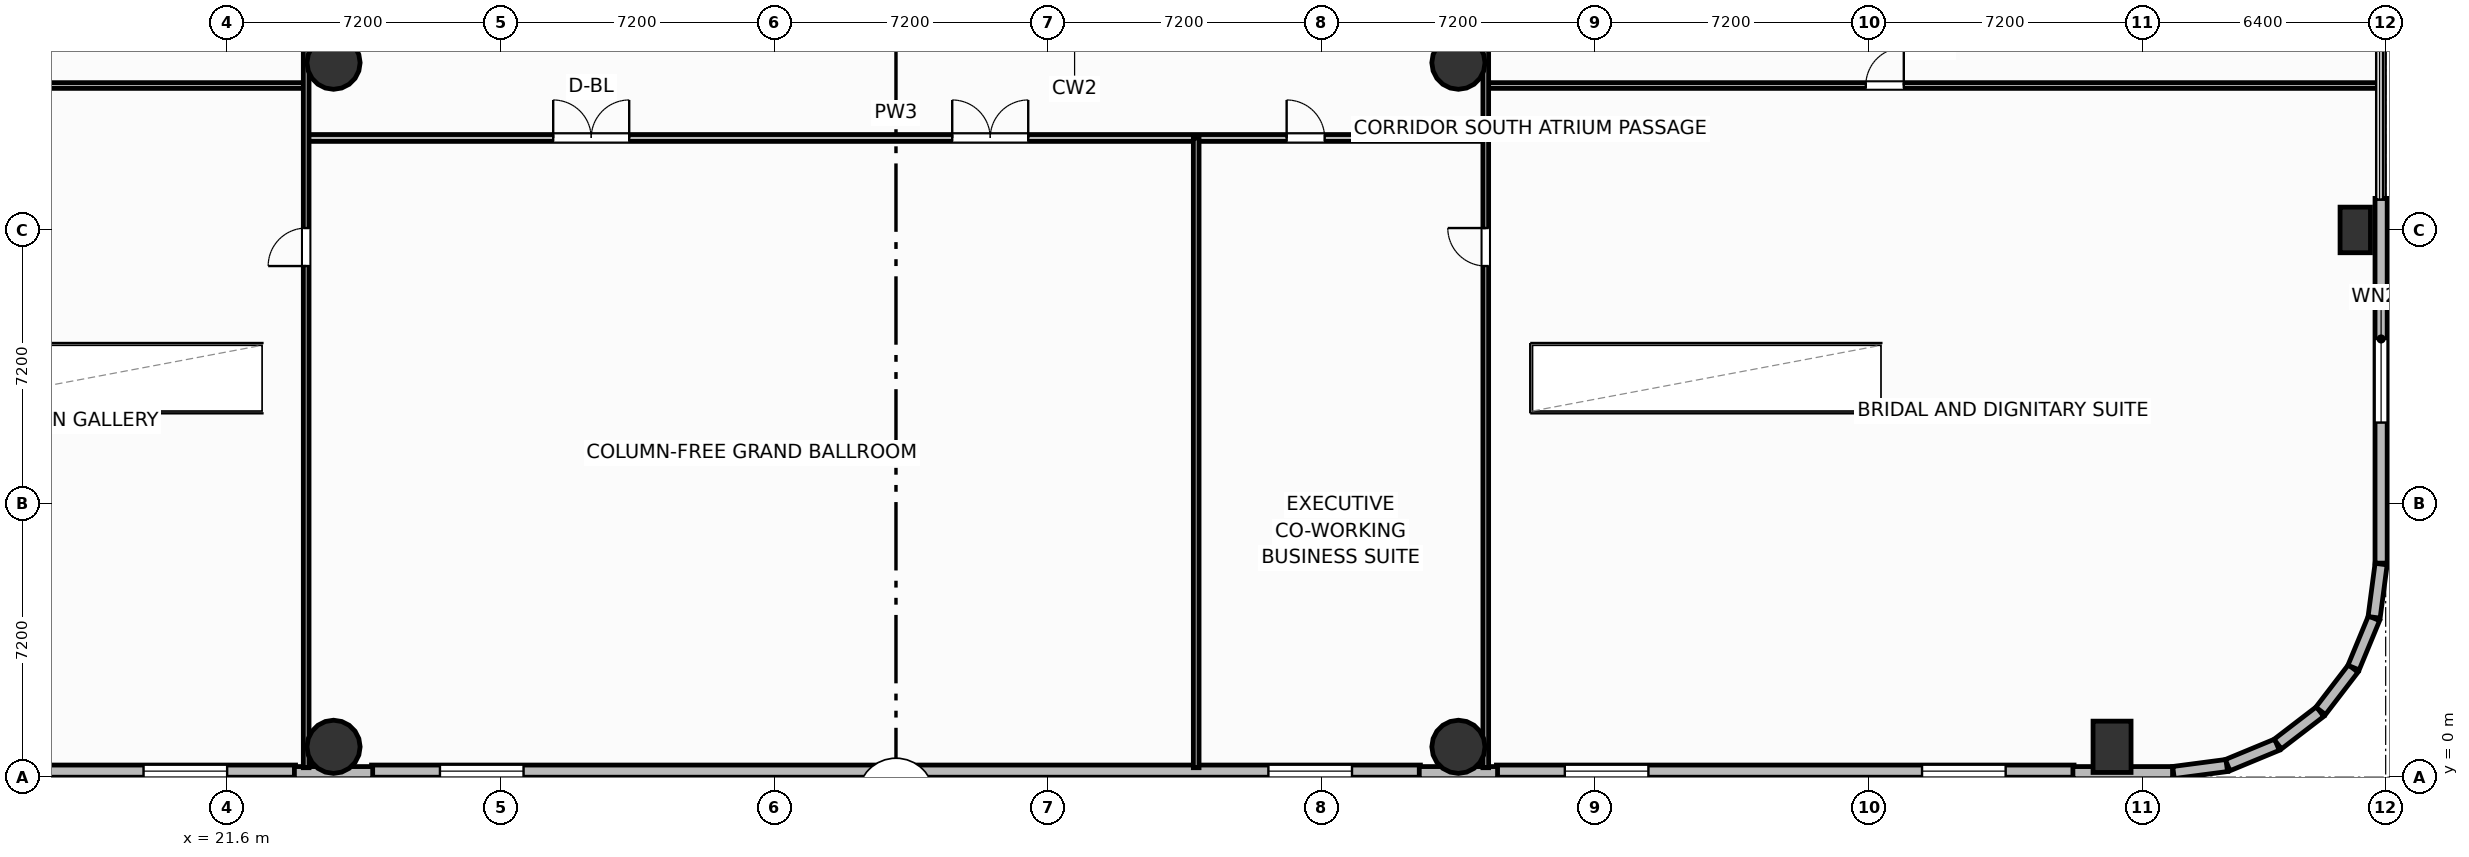
"""IFC4 building model, lengths in metres.
Left out: names, types, materials, properties, quantities, classifications, styles, units other than length and angle.
Written with IfcOpenShell. Run it as: python <this file> out.ifc"""

import sys

from ifc_helpers import new_model, si_unit, direction, frame, frame_2d, origin, origin_2d, place, context, subcontext, project, spatial, rectangle, circle, extrude, element, fill, save


model = new_model("IFC4")
c1 = context("Model", 3, precision=1e-05, world=origin(), true_north=direction((0.0, 1.0)))
c2 = subcontext(c1, "Body", "Model", "MODEL_VIEW")
j1 = project(units=[si_unit("LENGTHUNIT", "METRE"), si_unit("PLANEANGLEUNIT", "RADIAN")], contexts=[c1])
p1 = place(None, origin())
s1 = spatial("IfcSite", under=j1, at=p1, CompositionType="ELEMENT")
p2 = place(p1, origin())
s2 = spatial("IfcBuilding", under=s1, at=p2, CompositionType="ELEMENT")
p3 = place(p2, frame((0.0, 0.0, 16.2)))
s3 = spatial("IfcBuildingStorey", under=s2, at=p3, CompositionType="ELEMENT", Elevation=16.2)
for number, where, z_axis, x_axis in (
    (1, (24.4, 0.8, 0.0), (0.0, 0.0, 1.0), (1.0, 0.0, 0.0)),
    (2, (54.0, 0.8, 0.0), (0.0, 0.0, 1.0), (1.0, 0.0, 0.0)),
):
    element("IfcColumn", number, at=place(p3, frame(where, z_axis=z_axis, x_axis=x_axis)), inside=s3, PredefinedType="COLUMN", context=c2, shape_type="SweptSolid", body=[
        extrude(circle(Radius=0.7, at=origin_2d()), origin(), (0.0, 0.0, 1.0), 5.4),
    ])
p4 = place(p3, frame((71.2, 0.8, 0.0), z_axis=(0.0, 0.0, 1.0), x_axis=(1.0, 0.0, 0.0)))
e3 = element("IfcColumn", 3, at=p4, inside=s3, PredefinedType="COLUMN", context=c2, shape_type="SweptSolid", body=[
    extrude(rectangle(XDim=1.0, YDim=1.35, at=origin_2d()), origin(), (0.0, 0.0, 1.0), 5.4),
])
for number, where, z_axis, x_axis in (
    (4, (24.4, 18.8, 0.0), (0.0, 0.0, 1.0), (1.0, 0.0, 0.0)),
    (5, (54.0, 18.8, 0.0), (0.0, 0.0, 1.0), (1.0, 0.0, 0.0)),
):
    element("IfcColumn", number, at=place(p3, frame(where, z_axis=z_axis, x_axis=x_axis)), inside=s3, PredefinedType="COLUMN", context=c2, shape_type="SweptSolid", body=[
        extrude(circle(Radius=0.7, at=origin_2d()), origin(), (0.0, 0.0, 1.0), 5.4),
    ])
p5 = place(p3, frame((77.6, 14.4, 0.0), z_axis=(0.0, 0.0, 1.0), x_axis=(1.0, 0.0, 0.0)))
e6 = element("IfcColumn", 6, at=p5, inside=s3, PredefinedType="PILASTER", context=c2, shape_type="SweptSolid", body=[
    extrude(rectangle(XDim=0.8, YDim=1.2, at=origin_2d()), origin(), (0.0, 0.0, 1.0), 5.4),
])
p6 = place(p3, frame((23.4, 0.16, 0.0), z_axis=(0.0, 0.0, 1.0), x_axis=(-1.0, 0.0, 0.0)))
e7 = element("IfcWall", 7, at=p6, inside=s3, PredefinedType="SOLIDWALL", context=c2, shape_type="SweptSolid", body=[
    extrude(rectangle(XDim=15.2, YDim=0.32, at=frame_2d((7.6, 0.0))), origin(), (0.0, 0.0, 1.0), 4.03),
])
p7 = place(p6, frame((1.8, 0.0, 0.8)))
e8 = element("IfcOpeningElement", 8, at=p7, cuts=e7, PredefinedType="OPENING", context=c2, shape_type="SweptSolid", body=[
    extrude(rectangle(XDim=2.2, YDim=1.85, at=frame_2d((1.1, 0.925))), frame((0.0, 0.17, 0.0), z_axis=(0.0, -1.0, 0.0), x_axis=(1.0, 0.0, 0.0)), (0.0, 0.0, 1.0), 0.34),
])
p8 = place(p6, frame((11.2, 0.0, 0.8)))
e9 = element("IfcOpeningElement", 9, at=p8, cuts=e7, PredefinedType="OPENING", context=c2, shape_type="SweptSolid", body=[
    extrude(rectangle(XDim=2.2, YDim=1.85, at=frame_2d((1.1, 0.925))), frame((0.0, 0.17, 0.0), z_axis=(0.0, -1.0, 0.0), x_axis=(1.0, 0.0, 0.0)), (0.0, 0.0, 1.0), 0.34),
])
p9 = place(p3, frame((53.0, 0.16, 0.0), z_axis=(0.0, 0.0, 1.0), x_axis=(-1.0, 0.0, 0.0)))
e10 = element("IfcWall", 10, at=p9, inside=s3, PredefinedType="SOLIDWALL", context=c2, shape_type="SweptSolid", body=[
    extrude(rectangle(XDim=27.6, YDim=0.32, at=frame_2d((13.8, 0.0))), origin(), (0.0, 0.0, 1.0), 4.03),
])
p10 = place(p9, frame((1.8, 0.0, 0.8)))
e11 = element("IfcOpeningElement", 11, at=p10, cuts=e10, PredefinedType="OPENING", context=c2, shape_type="SweptSolid", body=[
    extrude(rectangle(XDim=2.2, YDim=1.85, at=frame_2d((1.1, 0.925))), frame((0.0, 0.17, 0.0), z_axis=(0.0, -1.0, 0.0), x_axis=(1.0, 0.0, 0.0)), (0.0, 0.0, 1.0), 0.34),
])
p11 = place(p9, frame((23.6, 0.0, 0.8)))
e12 = element("IfcOpeningElement", 12, at=p11, cuts=e10, PredefinedType="OPENING", context=c2, shape_type="SweptSolid", body=[
    extrude(rectangle(XDim=2.2, YDim=1.85, at=frame_2d((1.1, 0.925))), frame((0.0, 0.17, 0.0), z_axis=(0.0, -1.0, 0.0), x_axis=(1.0, 0.0, 0.0)), (0.0, 0.0, 1.0), 0.34),
])
p12 = place(p3, frame((70.2, 0.16, 0.0), z_axis=(0.0, 0.0, 1.0), x_axis=(-1.0, 0.0, 0.0)))
e13 = element("IfcWall", 13, at=p12, inside=s3, PredefinedType="SOLIDWALL", context=c2, shape_type="SweptSolid", body=[
    extrude(rectangle(XDim=15.2, YDim=0.32, at=frame_2d((7.6, 0.0))), origin(), (0.0, 0.0, 1.0), 4.03),
])
p13 = place(p12, frame((1.8, 0.0, 0.8)))
e14 = element("IfcOpeningElement", 14, at=p13, cuts=e13, PredefinedType="OPENING", context=c2, shape_type="SweptSolid", body=[
    extrude(rectangle(XDim=2.2, YDim=1.85, at=frame_2d((1.1, 0.925))), frame((0.0, 0.17, 0.0), z_axis=(0.0, -1.0, 0.0), x_axis=(1.0, 0.0, 0.0)), (0.0, 0.0, 1.0), 0.34),
])
p14 = place(p12, frame((11.2, 0.0, 0.8)))
e15 = element("IfcOpeningElement", 15, at=p14, cuts=e13, PredefinedType="OPENING", context=c2, shape_type="SweptSolid", body=[
    extrude(rectangle(XDim=2.2, YDim=1.85, at=frame_2d((1.1, 0.925))), frame((0.0, 0.17, 0.0), z_axis=(0.0, -1.0, 0.0), x_axis=(1.0, 0.0, 0.0)), (0.0, 0.0, 1.0), 0.34),
])
p15 = place(p3, frame((23.37, 0.12, 0.0), z_axis=(0.0, 0.0, 1.0), x_axis=(1.0, 0.0, 0.0)))
e16 = element("IfcWall", 16, at=p15, inside=s3, PredefinedType="SOLIDWALL", context=c2, shape_type="SweptSolid", body=[
    extrude(rectangle(XDim=2.06, YDim=0.32, at=frame_2d((1.03, 0.0))), origin(), (0.0, 0.0, 1.0), 4.03),
])
p16 = place(p3, frame((52.97, 0.12, 0.0), z_axis=(0.0, 0.0, 1.0), x_axis=(1.0, 0.0, 0.0)))
e17 = element("IfcWall", 17, at=p16, inside=s3, PredefinedType="SOLIDWALL", context=c2, shape_type="SweptSolid", body=[
    extrude(rectangle(XDim=2.06, YDim=0.32, at=frame_2d((1.03, 0.0))), origin(), (0.0, 0.0, 1.0), 4.03),
])
p17 = place(p3, frame((70.17, 0.12, 0.0), z_axis=(0.0, 0.0, 1.0), x_axis=(1.0, 0.0, 0.0)))
e18 = element("IfcWall", 18, at=p17, inside=s3, PredefinedType="SOLIDWALL", context=c2, shape_type="SweptSolid", body=[
    extrude(rectangle(XDim=2.622, YDim=0.32, at=frame_2d((1.311, 0.0))), origin(), (0.0, 0.0, 1.0), 4.03),
])
p18 = place(p3, frame((72.817, 0.123, 0.0), z_axis=(0.0, 0.0, 1.0), x_axis=(0.991457235349, 0.130432168094, 0.0)))
e19 = element("IfcWall", 19, at=p18, inside=s3, PredefinedType="SOLIDWALL", context=c2, shape_type="SweptSolid", body=[
    extrude(rectangle(XDim=1.413, YDim=0.32, at=frame_2d((0.707, 0.0))), origin(), (0.0, 0.0, 1.0), 4.03),
])
for number, where, z_axis, x_axis in (
    (20, (74.241, 0.317, 0.0), (0.0, 0.0, 1.0), (0.924, 0.383, 0.0)),
    (21, (75.559, 0.87, 0.0), (0.0, 0.0, 1.0), (0.793, 0.609, 0.0)),
    (22, (76.689, 1.746, 0.0), (0.0, 0.0, 1.0), (0.609, 0.793, 0.0)),
    (23, (77.554, 2.884, 0.0), (0.0, 0.0, 1.0), (0.383, 0.924, 0.0)),
):
    element("IfcWall", number, at=place(p3, frame(where, z_axis=z_axis, x_axis=x_axis)), inside=s3, PredefinedType="SOLIDWALL", context=c2, shape_type="SweptSolid", body=[
        extrude(rectangle(XDim=1.405, YDim=0.32, at=frame_2d((0.703, 0.0))), origin(), (0.0, 0.0, 1.0), 4.03),
    ])
p19 = place(p3, frame((78.096, 4.207, 0.0), z_axis=(0.0, 0.0, 1.0), x_axis=(0.130432168094, 0.991457235349, 0.0)))
e24 = element("IfcWall", 24, at=p19, inside=s3, PredefinedType="SOLIDWALL", context=c2, shape_type="SweptSolid", body=[
    extrude(rectangle(XDim=1.413, YDim=0.32, at=frame_2d((0.707, 0.0))), origin(), (0.0, 0.0, 1.0), 4.03),
])
p20 = place(p3, frame((78.28, 5.633, 0.0), z_axis=(0.0, 0.0, 1.0), x_axis=(0.0, 1.0, 0.0)))
e25 = element("IfcWall", 25, at=p20, inside=s3, PredefinedType="SOLIDWALL", context=c2, shape_type="SweptSolid", body=[
    extrude(rectangle(XDim=9.597, YDim=0.32, at=frame_2d((4.799, 0.0))), origin(), (0.0, 0.0, 1.0), 4.03),
])
p21 = place(p20, frame((3.698, 0.0, 0.8)))
e26 = element("IfcOpeningElement", 26, at=p21, cuts=e25, PredefinedType="OPENING", context=c2, shape_type="SweptSolid", body=[
    extrude(rectangle(XDim=2.2, YDim=2.0, at=frame_2d((1.1, 1.0))), frame((0.0, 0.17, 0.0), z_axis=(0.0, -1.0, 0.0), x_axis=(1.0, 0.0, 0.0)), (0.0, 0.0, 1.0), 0.34),
])
p22 = place(p3, frame((0.2, 18.2, 0.0), z_axis=(0.0, 0.0, 1.0), x_axis=(1.0, 0.0, 0.0)))
e27 = element("IfcWall", 27, at=p22, inside=s3, PredefinedType="PARTITIONING", context=c2, shape_type="SweptSolid", body=[
    extrude(rectangle(XDim=23.48, YDim=0.15, at=frame_2d((11.74, 0.0))), origin(), (0.0, 0.0, 1.0), 4.045),
])
p23 = place(p22, frame((10.1, 0.0, 0.0)))
e28 = element("IfcOpeningElement", 28, at=p23, cuts=e27, PredefinedType="OPENING", context=c2, shape_type="SweptSolid", body=[
    extrude(rectangle(XDim=1.0, YDim=2.05, at=frame_2d((0.5, 1.025))), frame((0.0, 0.085, 0.0), z_axis=(0.0, -1.0, 0.0), x_axis=(1.0, 0.0, 0.0)), (0.0, 0.0, 1.0), 0.17),
])
p24 = place(p3, frame((54.72, 18.2, 0.0), z_axis=(0.0, 0.0, 1.0), x_axis=(1.0, 0.0, 0.0)))
e29 = element("IfcWall", 29, at=p24, inside=s3, PredefinedType="PARTITIONING", context=c2, shape_type="SweptSolid", body=[
    extrude(rectangle(XDim=23.48, YDim=0.15, at=frame_2d((11.74, 0.0))), origin(), (0.0, 0.0, 1.0), 4.045),
])
p25 = place(p24, frame((10.0, 0.0, 0.0)))
e30 = element("IfcOpeningElement", 30, at=p25, cuts=e29, PredefinedType="OPENING", context=c2, shape_type="SweptSolid", body=[
    extrude(rectangle(XDim=1.0, YDim=2.05, at=frame_2d((0.5, 1.025))), frame((0.0, 0.085, 0.0), z_axis=(0.0, -1.0, 0.0), x_axis=(1.0, 0.0, 0.0)), (0.0, 0.0, 1.0), 0.17),
])
p26 = place(p3, frame((23.68, 16.82, 0.0), z_axis=(0.0, 0.0, 1.0), x_axis=(1.0, 0.0, 0.0)))
e31 = element("IfcWall", 31, at=p26, inside=s3, PredefinedType="PARTITIONING", context=c2, shape_type="SweptSolid", body=[
    extrude(rectangle(XDim=31.04, YDim=0.18, at=frame_2d((15.52, 0.0))), origin(), (0.0, 0.0, 1.0), 5.08),
])
p27 = place(p26, frame((6.5, 0.0, 0.0)))
e32 = element("IfcOpeningElement", 32, at=p27, cuts=e31, PredefinedType="OPENING", context=c2, shape_type="SweptSolid", body=[
    extrude(rectangle(XDim=2.0, YDim=2.05, at=frame_2d((1.0, 1.025))), frame((0.0, 0.1, 0.0), z_axis=(0.0, -1.0, 0.0), x_axis=(1.0, 0.0, 0.0)), (0.0, 0.0, 1.0), 0.2),
])
p28 = place(p26, frame((17.0, 0.0, 0.0)))
e33 = element("IfcOpeningElement", 33, at=p28, cuts=e31, PredefinedType="OPENING", context=c2, shape_type="SweptSolid", body=[
    extrude(rectangle(XDim=2.0, YDim=2.05, at=frame_2d((1.0, 1.025))), frame((0.0, 0.1, 0.0), z_axis=(0.0, -1.0, 0.0), x_axis=(1.0, 0.0, 0.0)), (0.0, 0.0, 1.0), 0.2),
])
p29 = place(p26, frame((25.8, 0.0, 0.0)))
e34 = element("IfcOpeningElement", 34, at=p29, cuts=e31, PredefinedType="OPENING", context=c2, shape_type="SweptSolid", body=[
    extrude(rectangle(XDim=1.0, YDim=2.05, at=frame_2d((0.5, 1.025))), frame((0.0, 0.1, 0.0), z_axis=(0.0, -1.0, 0.0), x_axis=(1.0, 0.0, 0.0)), (0.0, 0.0, 1.0), 0.2),
])
p30 = place(p3, frame((47.1, 0.25, 0.0), z_axis=(0.0, 0.0, 1.0), x_axis=(0.0, 1.0, 0.0)))
e35 = element("IfcWall", 35, at=p30, inside=s3, PredefinedType="PARTITIONING", context=c2, shape_type="SweptSolid", body=[
    extrude(rectangle(XDim=16.57, YDim=0.15, at=frame_2d((8.285, 0.0))), origin(), (0.0, 0.0, 1.0), 5.08),
])
p31 = place(p3, frame((23.68, 0.25, 0.0), z_axis=(0.0, 0.0, 1.0), x_axis=(0.0, 1.0, 0.0)))
e36 = element("IfcWall", 36, at=p31, inside=s3, PredefinedType="PARTITIONING", context=c2, shape_type="SweptSolid", body=[
    extrude(rectangle(XDim=26.37, YDim=0.15, at=frame_2d((13.185, 0.0))), origin(), (0.0, 0.0, 1.0), 5.08),
])
p32 = place(p31, frame((13.2, 0.0, 0.0)))
e37 = element("IfcOpeningElement", 37, at=p32, cuts=e36, PredefinedType="OPENING", context=c2, shape_type="SweptSolid", body=[
    extrude(rectangle(XDim=1.0, YDim=2.05, at=frame_2d((0.5, 1.025))), frame((0.0, 0.085, 0.0), z_axis=(0.0, -1.0, 0.0), x_axis=(1.0, 0.0, 0.0)), (0.0, 0.0, 1.0), 0.17),
])
p33 = place(p31, frame((21.5, 0.0, 0.0)))
e38 = element("IfcOpeningElement", 38, at=p33, cuts=e36, PredefinedType="OPENING", context=c2, shape_type="SweptSolid", body=[
    extrude(rectangle(XDim=2.0, YDim=2.05, at=frame_2d((1.0, 1.025))), frame((0.0, 0.085, 0.0), z_axis=(0.0, -1.0, 0.0), x_axis=(1.0, 0.0, 0.0)), (0.0, 0.0, 1.0), 0.17),
])
p34 = place(p3, frame((54.72, 0.25, 0.0), z_axis=(0.0, 0.0, 1.0), x_axis=(0.0, 1.0, 0.0)))
e39 = element("IfcWall", 39, at=p34, inside=s3, PredefinedType="PARTITIONING", context=c2, shape_type="SweptSolid", body=[
    extrude(rectangle(XDim=26.37, YDim=0.15, at=frame_2d((13.185, 0.0))), origin(), (0.0, 0.0, 1.0), 5.08),
])
p35 = place(p34, frame((13.2, 0.0, 0.0)))
e40 = element("IfcOpeningElement", 40, at=p35, cuts=e39, PredefinedType="OPENING", context=c2, shape_type="SweptSolid", body=[
    extrude(rectangle(XDim=1.0, YDim=2.05, at=frame_2d((0.5, 1.025))), frame((0.0, 0.085, 0.0), z_axis=(0.0, -1.0, 0.0), x_axis=(1.0, 0.0, 0.0)), (0.0, 0.0, 1.0), 0.17),
])
p36 = place(p34, frame((21.5, 0.0, 0.0)))
e41 = element("IfcOpeningElement", 41, at=p36, cuts=e39, PredefinedType="OPENING", context=c2, shape_type="SweptSolid", body=[
    extrude(rectangle(XDim=1.0, YDim=2.05, at=frame_2d((0.5, 1.025))), frame((0.0, 0.085, 0.0), z_axis=(0.0, -1.0, 0.0), x_axis=(1.0, 0.0, 0.0)), (0.0, 0.0, 1.0), 0.17),
])
p37 = place(p7, origin())
e42 = element("IfcWindow", 42, at=p37, inside=s3, PartitioningType="SINGLE_PANEL", PredefinedType="WINDOW", context=c2, shape_type="SweptSolid", body=[
    extrude(rectangle(XDim=2.2, YDim=1.85, at=frame_2d((1.1, 0.925))), frame((0.0, 0.03, 0.0), z_axis=(0.0, -1.0, 0.0), x_axis=(1.0, 0.0, 0.0)), (0.0, 0.0, 1.0), 0.06),
])
fill(e8, e42)
p38 = place(p10, origin())
e43 = element("IfcWindow", 43, at=p38, inside=s3, PartitioningType="SINGLE_PANEL", PredefinedType="WINDOW", context=c2, shape_type="SweptSolid", body=[
    extrude(rectangle(XDim=2.2, YDim=1.85, at=frame_2d((1.1, 0.925))), frame((0.0, 0.03, 0.0), z_axis=(0.0, -1.0, 0.0), x_axis=(1.0, 0.0, 0.0)), (0.0, 0.0, 1.0), 0.06),
])
fill(e11, e43)
p39 = place(p11, origin())
e44 = element("IfcWindow", 44, at=p39, inside=s3, PartitioningType="SINGLE_PANEL", PredefinedType="WINDOW", context=c2, shape_type="SweptSolid", body=[
    extrude(rectangle(XDim=2.2, YDim=1.85, at=frame_2d((1.1, 0.925))), frame((0.0, 0.03, 0.0), z_axis=(0.0, -1.0, 0.0), x_axis=(1.0, 0.0, 0.0)), (0.0, 0.0, 1.0), 0.06),
])
fill(e12, e44)
p40 = place(p13, origin())
e45 = element("IfcWindow", 45, at=p40, inside=s3, PartitioningType="SINGLE_PANEL", PredefinedType="WINDOW", context=c2, shape_type="SweptSolid", body=[
    extrude(rectangle(XDim=2.2, YDim=1.85, at=frame_2d((1.1, 0.925))), frame((0.0, 0.03, 0.0), z_axis=(0.0, -1.0, 0.0), x_axis=(1.0, 0.0, 0.0)), (0.0, 0.0, 1.0), 0.06),
])
fill(e14, e45)
p41 = place(p14, origin())
e46 = element("IfcWindow", 46, at=p41, inside=s3, PartitioningType="SINGLE_PANEL", PredefinedType="WINDOW", context=c2, shape_type="SweptSolid", body=[
    extrude(rectangle(XDim=2.2, YDim=1.85, at=frame_2d((1.1, 0.925))), frame((0.0, 0.03, 0.0), z_axis=(0.0, -1.0, 0.0), x_axis=(1.0, 0.0, 0.0)), (0.0, 0.0, 1.0), 0.06),
])
fill(e15, e46)
p42 = place(p21, origin())
e47 = element("IfcWindow", 47, at=p42, inside=s3, PartitioningType="SINGLE_PANEL", PredefinedType="WINDOW", context=c2, shape_type="SweptSolid", body=[
    extrude(rectangle(XDim=2.2, YDim=2.0, at=frame_2d((1.1, 1.0))), frame((0.0, 0.03, 0.0), z_axis=(0.0, -1.0, 0.0), x_axis=(1.0, 0.0, 0.0)), (0.0, 0.0, 1.0), 0.06),
])
fill(e26, e47)
p43 = place(p25, origin())
e48 = element("IfcDoor", 48, at=p43, inside=s3, OperationType="SINGLE_SWING_RIGHT", PredefinedType="DOOR", context=c2, shape_type="SweptSolid", body=[
    extrude(rectangle(XDim=1.0, YDim=2.05, at=frame_2d((0.5, 1.025))), frame((0.0, 0.025, 0.0), z_axis=(0.0, -1.0, 0.0), x_axis=(1.0, 0.0, 0.0)), (0.0, 0.0, 1.0), 0.05),
])
fill(e30, e48)
p44 = place(p27, origin())
e49 = element("IfcDoor", 49, at=p44, inside=s3, OperationType="DOUBLE_DOOR_SINGLE_SWING", PredefinedType="DOOR", context=c2, shape_type="SweptSolid", body=[
    extrude(rectangle(XDim=2.0, YDim=2.05, at=frame_2d((1.0, 1.025))), frame((0.0, 0.025, 0.0), z_axis=(0.0, -1.0, 0.0), x_axis=(1.0, 0.0, 0.0)), (0.0, 0.0, 1.0), 0.05),
])
fill(e32, e49)
p45 = place(p28, origin())
e50 = element("IfcDoor", 50, at=p45, inside=s3, OperationType="DOUBLE_DOOR_SINGLE_SWING", PredefinedType="DOOR", context=c2, shape_type="SweptSolid", body=[
    extrude(rectangle(XDim=2.0, YDim=2.05, at=frame_2d((1.0, 1.025))), frame((0.0, 0.025, 0.0), z_axis=(0.0, -1.0, 0.0), x_axis=(1.0, 0.0, 0.0)), (0.0, 0.0, 1.0), 0.05),
])
fill(e33, e50)
p46 = place(p29, origin())
e51 = element("IfcDoor", 51, at=p46, inside=s3, OperationType="SINGLE_SWING_LEFT", PredefinedType="DOOR", context=c2, shape_type="SweptSolid", body=[
    extrude(rectangle(XDim=1.0, YDim=2.05, at=frame_2d((0.5, 1.025))), frame((0.0, 0.025, 0.0), z_axis=(0.0, -1.0, 0.0), x_axis=(1.0, 0.0, 0.0)), (0.0, 0.0, 1.0), 0.05),
])
fill(e34, e51)
p47 = place(p32, origin())
e52 = element("IfcDoor", 52, at=p47, inside=s3, OperationType="SINGLE_SWING_LEFT", PredefinedType="DOOR", context=c2, shape_type="SweptSolid", body=[
    extrude(rectangle(XDim=1.0, YDim=2.05, at=frame_2d((0.5, 1.025))), frame((0.0, 0.025, 0.0), z_axis=(0.0, -1.0, 0.0), x_axis=(1.0, 0.0, 0.0)), (0.0, 0.0, 1.0), 0.05),
])
fill(e37, e52)
p48 = place(p35, origin())
e53 = element("IfcDoor", 53, at=p48, inside=s3, OperationType="SINGLE_SWING_RIGHT", PredefinedType="DOOR", context=c2, shape_type="SweptSolid", body=[
    extrude(rectangle(XDim=1.0, YDim=2.05, at=frame_2d((0.5, 1.025))), frame((0.0, 0.025, 0.0), z_axis=(0.0, -1.0, 0.0), x_axis=(1.0, 0.0, 0.0)), (0.0, 0.0, 1.0), 0.05),
])
fill(e40, e53)
save(model, sys.argv[1])
